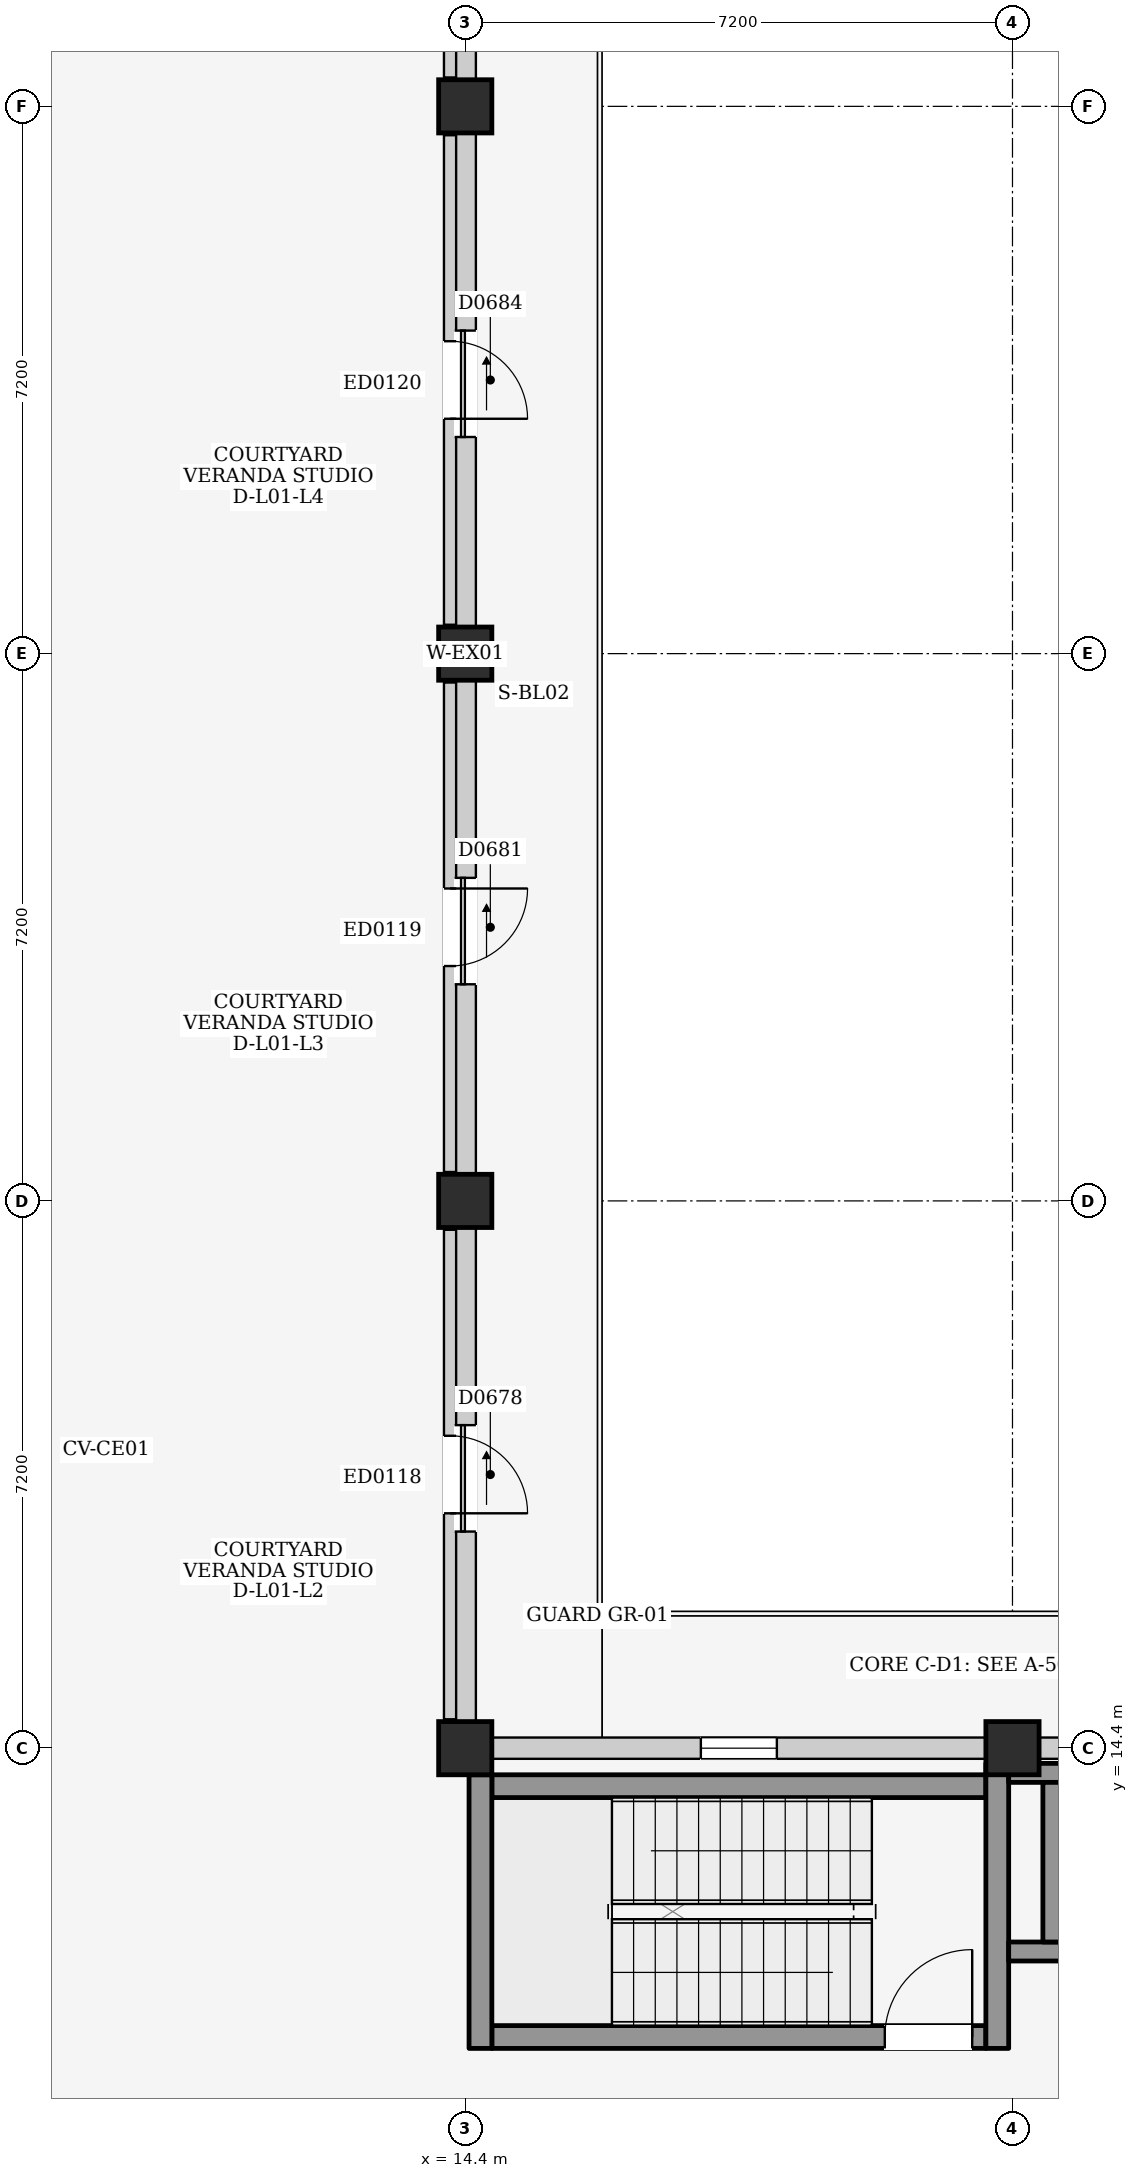
"""IFC4 building model, lengths in metres.
Left out: names, types, materials, properties, quantities, classifications, styles, units other than length and angle.
Written with IfcOpenShell. Run it as: python <this file> out.ifc"""

import sys

from ifc_helpers import new_model, si_unit, direction, frame, frame_2d, origin, origin_2d, place, context, subcontext, project, spatial, rectangle, extrude, element, fill, save


model = new_model("IFC4")
c1 = context("Model", 3, precision=1e-05, world=origin(), true_north=direction((0.0, 1.0)))
c2 = subcontext(c1, "Body", "Model", "MODEL_VIEW")
j1 = project(units=[si_unit("LENGTHUNIT", "METRE"), si_unit("PLANEANGLEUNIT", "RADIAN")], contexts=[c1])
p1 = place(None, origin())
s1 = spatial("IfcSite", under=j1, at=p1, CompositionType="ELEMENT")
p2 = place(p1, origin())
s2 = spatial("IfcBuilding", under=s1, at=p2, CompositionType="ELEMENT")
p3 = place(p2, frame((0.0, 0.0, 4.5)))
s3 = spatial("IfcBuildingStorey", under=s2, at=p3, CompositionType="ELEMENT", Elevation=4.5)
for number, where, z_axis, x_axis in (
    (1, (14.4, 14.4, 0.0), (0.0, 0.0, 1.0), (1.0, 0.0, 0.0)),
    (2, (14.4, 21.6, 0.0), (0.0, 0.0, 1.0), (1.0, 0.0, 0.0)),
    (3, (14.4, 28.8, 0.0), (0.0, 0.0, 1.0), (1.0, 0.0, 0.0)),
    (4, (14.4, 36.0, 0.0), (0.0, 0.0, 1.0), (1.0, 0.0, 0.0)),
    (5, (21.6, 14.4, 0.0), (0.0, 0.0, 1.0), (1.0, 0.0, 0.0)),
):
    element("IfcColumn", number, at=place(p3, frame(where, z_axis=z_axis, x_axis=x_axis)), inside=s3, PredefinedType="COLUMN", context=c2, shape_type="SweptSolid", body=[
        extrude(rectangle(XDim=0.7, YDim=0.7, at=origin_2d()), origin(), (0.0, 0.0, 1.0), 4.5),
    ])
p4 = place(p3, frame((14.4, 14.75, 0.0), z_axis=(0.0, 0.0, 1.0), x_axis=(0.0, 1.0, 0.0)))
e6 = element("IfcWall", 6, at=p4, inside=s3, PredefinedType="ELEMENTEDWALL", context=c2, shape_type="SweptSolid", body=[
    extrude(rectangle(XDim=6.5, YDim=0.28, at=frame_2d((3.25, 0.0))), origin(), (0.0, 0.0, 1.0), 3.685),
])
p5 = place(p4, frame((2.5, 0.0, 0.0)))
e7 = element("IfcOpeningElement", 7, at=p5, cuts=e6, PredefinedType="OPENING", context=c2, shape_type="SweptSolid", body=[
    extrude(rectangle(XDim=1.4, YDim=2.1, at=frame_2d((0.7, 1.05))), frame((0.0, 0.155, 0.0), z_axis=(0.0, -1.0, 0.0), x_axis=(1.0, 0.0, 0.0)), (0.0, 0.0, 1.0), 0.31),
])
p6 = place(p3, frame((14.4, 21.95, 0.0), z_axis=(0.0, 0.0, 1.0), x_axis=(0.0, 1.0, 0.0)))
e8 = element("IfcWall", 8, at=p6, inside=s3, PredefinedType="ELEMENTEDWALL", context=c2, shape_type="SweptSolid", body=[
    extrude(rectangle(XDim=6.5, YDim=0.28, at=frame_2d((3.25, 0.0))), origin(), (0.0, 0.0, 1.0), 3.685),
])
p7 = place(p6, frame((2.5, 0.0, 0.0)))
e9 = element("IfcOpeningElement", 9, at=p7, cuts=e8, PredefinedType="OPENING", context=c2, shape_type="SweptSolid", body=[
    extrude(rectangle(XDim=1.4, YDim=2.1, at=frame_2d((0.7, 1.05))), frame((0.0, 0.155, 0.0), z_axis=(0.0, -1.0, 0.0), x_axis=(1.0, 0.0, 0.0)), (0.0, 0.0, 1.0), 0.31),
])
p8 = place(p3, frame((14.4, 29.15, 0.0), z_axis=(0.0, 0.0, 1.0), x_axis=(0.0, 1.0, 0.0)))
e10 = element("IfcWall", 10, at=p8, inside=s3, PredefinedType="ELEMENTEDWALL", context=c2, shape_type="SweptSolid", body=[
    extrude(rectangle(XDim=6.5, YDim=0.28, at=frame_2d((3.25, 0.0))), origin(), (0.0, 0.0, 1.0), 3.685),
])
p9 = place(p8, frame((2.5, 0.0, 0.0)))
e11 = element("IfcOpeningElement", 11, at=p9, cuts=e10, PredefinedType="OPENING", context=c2, shape_type="SweptSolid", body=[
    extrude(rectangle(XDim=1.4, YDim=2.1, at=frame_2d((0.7, 1.05))), frame((0.0, 0.155, 0.0), z_axis=(0.0, -1.0, 0.0), x_axis=(1.0, 0.0, 0.0)), (0.0, 0.0, 1.0), 0.31),
])
p10 = place(p3, frame((14.4, 36.35, 0.0), z_axis=(0.0, 0.0, 1.0), x_axis=(0.0, 1.0, 0.0)))
e12 = element("IfcWall", 12, at=p10, inside=s3, PredefinedType="ELEMENTEDWALL", context=c2, shape_type="SweptSolid", body=[
    extrude(rectangle(XDim=6.5, YDim=0.28, at=frame_2d((3.25, 0.0))), origin(), (0.0, 0.0, 1.0), 3.685),
])
p11 = place(p10, frame((2.5, 0.0, 0.0)))
e13 = element("IfcOpeningElement", 13, at=p11, cuts=e12, PredefinedType="OPENING", context=c2, shape_type="SweptSolid", body=[
    extrude(rectangle(XDim=1.4, YDim=2.1, at=frame_2d((0.7, 1.05))), frame((0.0, 0.155, 0.0), z_axis=(0.0, -1.0, 0.0), x_axis=(1.0, 0.0, 0.0)), (0.0, 0.0, 1.0), 0.31),
])
p12 = place(p3, frame((14.75, 14.4, 0.0), z_axis=(0.0, 0.0, 1.0), x_axis=(1.0, 0.0, 0.0)))
e14 = element("IfcWall", 14, at=p12, inside=s3, PredefinedType="ELEMENTEDWALL", context=c2, shape_type="SweptSolid", body=[
    extrude(rectangle(XDim=6.5, YDim=0.28, at=frame_2d((3.25, 0.0))), origin(), (0.0, 0.0, 1.0), 3.635),
])
p13 = place(p12, frame((2.75, 0.0, 1.2)))
e15 = element("IfcOpeningElement", 15, at=p13, cuts=e14, PredefinedType="OPENING", context=c2, shape_type="SweptSolid", body=[
    extrude(rectangle(XDim=1.0, YDim=0.9, at=frame_2d((0.5, 0.45))), frame((0.0, 0.155, 0.0), z_axis=(0.0, -1.0, 0.0), x_axis=(1.0, 0.0, 0.0)), (0.0, 0.0, 1.0), 0.31),
])
p14 = place(p3, frame((21.95, 14.4, 0.0), z_axis=(0.0, 0.0, 1.0), x_axis=(1.0, 0.0, 0.0)))
e16 = element("IfcWall", 16, at=p14, inside=s3, PredefinedType="ELEMENTEDWALL", context=c2, shape_type="SweptSolid", body=[
    extrude(rectangle(XDim=6.5, YDim=0.28, at=frame_2d((3.25, 0.0))), origin(), (0.0, 0.0, 1.0), 3.635),
])
p15 = place(p14, frame((2.75, 0.0, 1.2)))
e17 = element("IfcOpeningElement", 17, at=p15, cuts=e16, PredefinedType="OPENING", context=c2, shape_type="SweptSolid", body=[
    extrude(rectangle(XDim=1.0, YDim=0.9, at=frame_2d((0.5, 0.45))), frame((0.0, 0.155, 0.0), z_axis=(0.0, -1.0, 0.0), x_axis=(1.0, 0.0, 0.0)), (0.0, 0.0, 1.0), 0.31),
])
p16 = place(p3, frame((14.75, 10.6, 0.0), z_axis=(0.0, 0.0, 1.0), x_axis=(1.0, 0.0, 0.0)))
e18 = element("IfcWall", 18, at=p16, inside=s3, PredefinedType="SHEAR", context=c2, shape_type="SweptSolid", body=[
    extrude(rectangle(XDim=6.5, YDim=0.3, at=frame_2d((3.25, 0.0))), origin(), (0.0, 0.0, 1.0), 4.25),
])
p17 = place(p16, frame((5.17, 0.0, 0.0)))
e19 = element("IfcOpeningElement", 19, at=p17, cuts=e18, PredefinedType="OPENING", context=c2, shape_type="SweptSolid", body=[
    extrude(rectangle(XDim=1.15, YDim=2.2, at=frame_2d((0.575, 1.1))), frame((0.0, 0.165, 0.0), z_axis=(0.0, -1.0, 0.0), x_axis=(1.0, 0.0, 0.0)), (0.0, 0.0, 1.0), 0.33),
])
p18 = place(p3, frame((14.75, 13.9, 0.0), z_axis=(0.0, 0.0, 1.0), x_axis=(1.0, 0.0, 0.0)))
e20 = element("IfcWall", 20, at=p18, inside=s3, PredefinedType="SHEAR", context=c2, shape_type="SweptSolid", body=[
    extrude(rectangle(XDim=6.5, YDim=0.3, at=frame_2d((3.25, 0.0))), origin(), (0.0, 0.0, 1.0), 4.25),
])
p19 = place(p3, frame((14.6, 10.45, 0.0), z_axis=(0.0, 0.0, 1.0), x_axis=(0.0, 1.0, 0.0)))
e21 = element("IfcWall", 21, at=p19, inside=s3, PredefinedType="SHEAR", context=c2, shape_type="SweptSolid", body=[
    extrude(rectangle(XDim=3.6, YDim=0.3, at=frame_2d((1.8, 0.0))), origin(), (0.0, 0.0, 1.0), 4.25),
])
p20 = place(p3, frame((21.4, 10.45, 0.0), z_axis=(0.0, 0.0, 1.0), x_axis=(0.0, 1.0, 0.0)))
e22 = element("IfcWall", 22, at=p20, inside=s3, PredefinedType="SHEAR", context=c2, shape_type="SweptSolid", body=[
    extrude(rectangle(XDim=3.75, YDim=0.3, at=frame_2d((1.875, 0.0))), origin(), (0.0, 0.0, 1.0), 4.25),
])
p21 = place(p3, frame((21.55, 11.725, 0.0), z_axis=(0.0, 0.0, 1.0), x_axis=(1.0, 0.0, 0.0)))
e23 = element("IfcWall", 23, at=p21, inside=s3, PredefinedType="SHEAR", context=c2, shape_type="SweptSolid", body=[
    extrude(rectangle(XDim=2.55, YDim=0.25, at=frame_2d((1.275, 0.0))), origin(), (0.0, 0.0, 1.0), 4.25),
])
p22 = place(p21, frame((0.95, 0.0, 0.0)))
e24 = element("IfcOpeningElement", 24, at=p22, cuts=e23, PredefinedType="OPENING", context=c2, shape_type="SweptSolid", body=[
    extrude(rectangle(XDim=1.1, YDim=2.15, at=frame_2d((0.55, 1.075))), frame((0.0, 0.14, 0.0), z_axis=(0.0, -1.0, 0.0), x_axis=(1.0, 0.0, 0.0)), (0.0, 0.0, 1.0), 0.28),
])
p23 = place(p3, frame((21.55, 14.075, 0.0), z_axis=(0.0, 0.0, 1.0), x_axis=(1.0, 0.0, 0.0)))
e25 = element("IfcWall", 25, at=p23, inside=s3, PredefinedType="SHEAR", context=c2, shape_type="SweptSolid", body=[
    extrude(rectangle(XDim=2.55, YDim=0.25, at=frame_2d((1.275, 0.0))), origin(), (0.0, 0.0, 1.0), 4.25),
])
p24 = place(p3, frame((22.125, 11.85, 0.0), z_axis=(0.0, 0.0, 1.0), x_axis=(0.0, 1.0, 0.0)))
e26 = element("IfcWall", 26, at=p24, inside=s3, PredefinedType="SHEAR", context=c2, shape_type="SweptSolid", body=[
    extrude(rectangle(XDim=2.1, YDim=0.25, at=frame_2d((1.05, 0.0))), origin(), (0.0, 0.0, 1.0), 4.25),
])
p25 = place(p3, frame((14.2, 14.78, 0.0), z_axis=(0.0, 0.0, 1.0), x_axis=(0.0, 1.0, 0.0)))
e27 = element("IfcWall", 27, at=p25, inside=s3, PredefinedType="PARTITIONING", context=c2, shape_type="SweptSolid", body=[
    extrude(rectangle(XDim=6.44, YDim=0.16, at=frame_2d((3.22, 0.0))), origin(), (0.0, 0.0, 1.0), 3.685),
])
p26 = place(p25, frame((2.71, 0.0, 0.0)))
e28 = element("IfcOpeningElement", 28, at=p26, cuts=e27, PredefinedType="OPENING", context=c2, shape_type="SweptSolid", body=[
    extrude(rectangle(XDim=1.02, YDim=2.18, at=frame_2d((0.51, 1.09))), frame((0.0, 0.095, 0.0), z_axis=(0.0, -1.0, 0.0), x_axis=(1.0, 0.0, 0.0)), (0.0, 0.0, 1.0), 0.19),
])
p27 = place(p3, frame((14.2, 21.98, 0.0), z_axis=(0.0, 0.0, 1.0), x_axis=(0.0, 1.0, 0.0)))
e29 = element("IfcWall", 29, at=p27, inside=s3, PredefinedType="PARTITIONING", context=c2, shape_type="SweptSolid", body=[
    extrude(rectangle(XDim=6.44, YDim=0.16, at=frame_2d((3.22, 0.0))), origin(), (0.0, 0.0, 1.0), 3.685),
])
p28 = place(p27, frame((2.71, 0.0, 0.0)))
e30 = element("IfcOpeningElement", 30, at=p28, cuts=e29, PredefinedType="OPENING", context=c2, shape_type="SweptSolid", body=[
    extrude(rectangle(XDim=1.02, YDim=2.18, at=frame_2d((0.51, 1.09))), frame((0.0, 0.095, 0.0), z_axis=(0.0, -1.0, 0.0), x_axis=(1.0, 0.0, 0.0)), (0.0, 0.0, 1.0), 0.19),
])
p29 = place(p3, frame((14.2, 29.18, 0.0), z_axis=(0.0, 0.0, 1.0), x_axis=(0.0, 1.0, 0.0)))
e31 = element("IfcWall", 31, at=p29, inside=s3, PredefinedType="PARTITIONING", context=c2, shape_type="SweptSolid", body=[
    extrude(rectangle(XDim=6.44, YDim=0.16, at=frame_2d((3.22, 0.0))), origin(), (0.0, 0.0, 1.0), 3.685),
])
p30 = place(p29, frame((2.71, 0.0, 0.0)))
e32 = element("IfcOpeningElement", 32, at=p30, cuts=e31, PredefinedType="OPENING", context=c2, shape_type="SweptSolid", body=[
    extrude(rectangle(XDim=1.02, YDim=2.18, at=frame_2d((0.51, 1.09))), frame((0.0, 0.095, 0.0), z_axis=(0.0, -1.0, 0.0), x_axis=(1.0, 0.0, 0.0)), (0.0, 0.0, 1.0), 0.19),
])
p31 = place(p3, frame((14.2, 36.38, 0.0), z_axis=(0.0, 0.0, 1.0), x_axis=(0.0, 1.0, 0.0)))
e33 = element("IfcWall", 33, at=p31, inside=s3, PredefinedType="PARTITIONING", context=c2, shape_type="SweptSolid", body=[
    extrude(rectangle(XDim=6.44, YDim=0.16, at=frame_2d((3.22, 0.0))), origin(), (0.0, 0.0, 1.0), 3.685),
])
p32 = place(p31, frame((2.71, 0.0, 0.0)))
e34 = element("IfcOpeningElement", 34, at=p32, cuts=e33, PredefinedType="OPENING", context=c2, shape_type="SweptSolid", body=[
    extrude(rectangle(XDim=1.02, YDim=2.18, at=frame_2d((0.51, 1.09))), frame((0.0, 0.095, 0.0), z_axis=(0.0, -1.0, 0.0), x_axis=(1.0, 0.0, 0.0)), (0.0, 0.0, 1.0), 0.19),
])
p33 = place(p5, frame((1.4, 0.0, 0.0), z_axis=(0.0, 0.0, 1.0), x_axis=(-1.0, 0.0, 0.0)))
e35 = element("IfcDoor", 35, at=p33, inside=s3, OperationType="SLIDING_TO_RIGHT", PredefinedType="DOOR", context=c2, shape_type="SweptSolid", body=[
    extrude(rectangle(XDim=1.4, YDim=2.1, at=frame_2d((0.7, 1.05))), frame((0.0, 0.025, 0.0), z_axis=(0.0, -1.0, 0.0), x_axis=(1.0, 0.0, 0.0)), (0.0, 0.0, 1.0), 0.05),
])
fill(e7, e35)
p34 = place(p7, frame((1.4, 0.0, 0.0), z_axis=(0.0, 0.0, 1.0), x_axis=(-1.0, 0.0, 0.0)))
e36 = element("IfcDoor", 36, at=p34, inside=s3, OperationType="SLIDING_TO_RIGHT", PredefinedType="DOOR", context=c2, shape_type="SweptSolid", body=[
    extrude(rectangle(XDim=1.4, YDim=2.1, at=frame_2d((0.7, 1.05))), frame((0.0, 0.025, 0.0), z_axis=(0.0, -1.0, 0.0), x_axis=(1.0, 0.0, 0.0)), (0.0, 0.0, 1.0), 0.05),
])
fill(e9, e36)
p35 = place(p9, frame((1.4, 0.0, 0.0), z_axis=(0.0, 0.0, 1.0), x_axis=(-1.0, 0.0, 0.0)))
e37 = element("IfcDoor", 37, at=p35, inside=s3, OperationType="SLIDING_TO_RIGHT", PredefinedType="DOOR", context=c2, shape_type="SweptSolid", body=[
    extrude(rectangle(XDim=1.4, YDim=2.1, at=frame_2d((0.7, 1.05))), frame((0.0, 0.025, 0.0), z_axis=(0.0, -1.0, 0.0), x_axis=(1.0, 0.0, 0.0)), (0.0, 0.0, 1.0), 0.05),
])
fill(e11, e37)
p36 = place(p13, origin())
e38 = element("IfcWindow", 38, at=p36, inside=s3, PartitioningType="SINGLE_PANEL", PredefinedType="WINDOW", context=c2, shape_type="SweptSolid", body=[
    extrude(rectangle(XDim=1.0, YDim=0.9, at=frame_2d((0.5, 0.45))), frame((0.0, 0.03, 0.0), z_axis=(0.0, -1.0, 0.0), x_axis=(1.0, 0.0, 0.0)), (0.0, 0.0, 1.0), 0.06),
])
fill(e15, e38)
p37 = place(p17, origin())
e39 = element("IfcDoor", 39, at=p37, inside=s3, OperationType="SINGLE_SWING_RIGHT", PredefinedType="DOOR", context=c2, shape_type="SweptSolid", body=[
    extrude(rectangle(XDim=1.15, YDim=2.2, at=frame_2d((0.575, 1.1))), frame((0.0, 0.025, 0.0), z_axis=(0.0, -1.0, 0.0), x_axis=(1.0, 0.0, 0.0)), (0.0, 0.0, 1.0), 0.05),
])
fill(e19, e39)
p38 = place(p26, frame((1.02, 0.0, 0.0), z_axis=(0.0, 0.0, 1.0), x_axis=(-1.0, 0.0, 0.0)))
e40 = element("IfcDoor", 40, at=p38, inside=s3, OperationType="SINGLE_SWING_RIGHT", PredefinedType="DOOR", context=c2, shape_type="SweptSolid", body=[
    extrude(rectangle(XDim=1.02, YDim=2.18, at=frame_2d((0.51, 1.09))), frame((0.0, 0.025, 0.0), z_axis=(0.0, -1.0, 0.0), x_axis=(1.0, 0.0, 0.0)), (0.0, 0.0, 1.0), 0.05),
])
fill(e28, e40)
p39 = place(p28, frame((1.02, 0.0, 0.0), z_axis=(0.0, 0.0, 1.0), x_axis=(-1.0, 0.0, 0.0)))
e41 = element("IfcDoor", 41, at=p39, inside=s3, OperationType="SINGLE_SWING_LEFT", PredefinedType="DOOR", context=c2, shape_type="SweptSolid", body=[
    extrude(rectangle(XDim=1.02, YDim=2.18, at=frame_2d((0.51, 1.09))), frame((0.0, 0.025, 0.0), z_axis=(0.0, -1.0, 0.0), x_axis=(1.0, 0.0, 0.0)), (0.0, 0.0, 1.0), 0.05),
])
fill(e30, e41)
p40 = place(p30, frame((1.02, 0.0, 0.0), z_axis=(0.0, 0.0, 1.0), x_axis=(-1.0, 0.0, 0.0)))
e42 = element("IfcDoor", 42, at=p40, inside=s3, OperationType="SINGLE_SWING_RIGHT", PredefinedType="DOOR", context=c2, shape_type="SweptSolid", body=[
    extrude(rectangle(XDim=1.02, YDim=2.18, at=frame_2d((0.51, 1.09))), frame((0.0, 0.025, 0.0), z_axis=(0.0, -1.0, 0.0), x_axis=(1.0, 0.0, 0.0)), (0.0, 0.0, 1.0), 0.05),
])
fill(e32, e42)
save(model, sys.argv[1])
